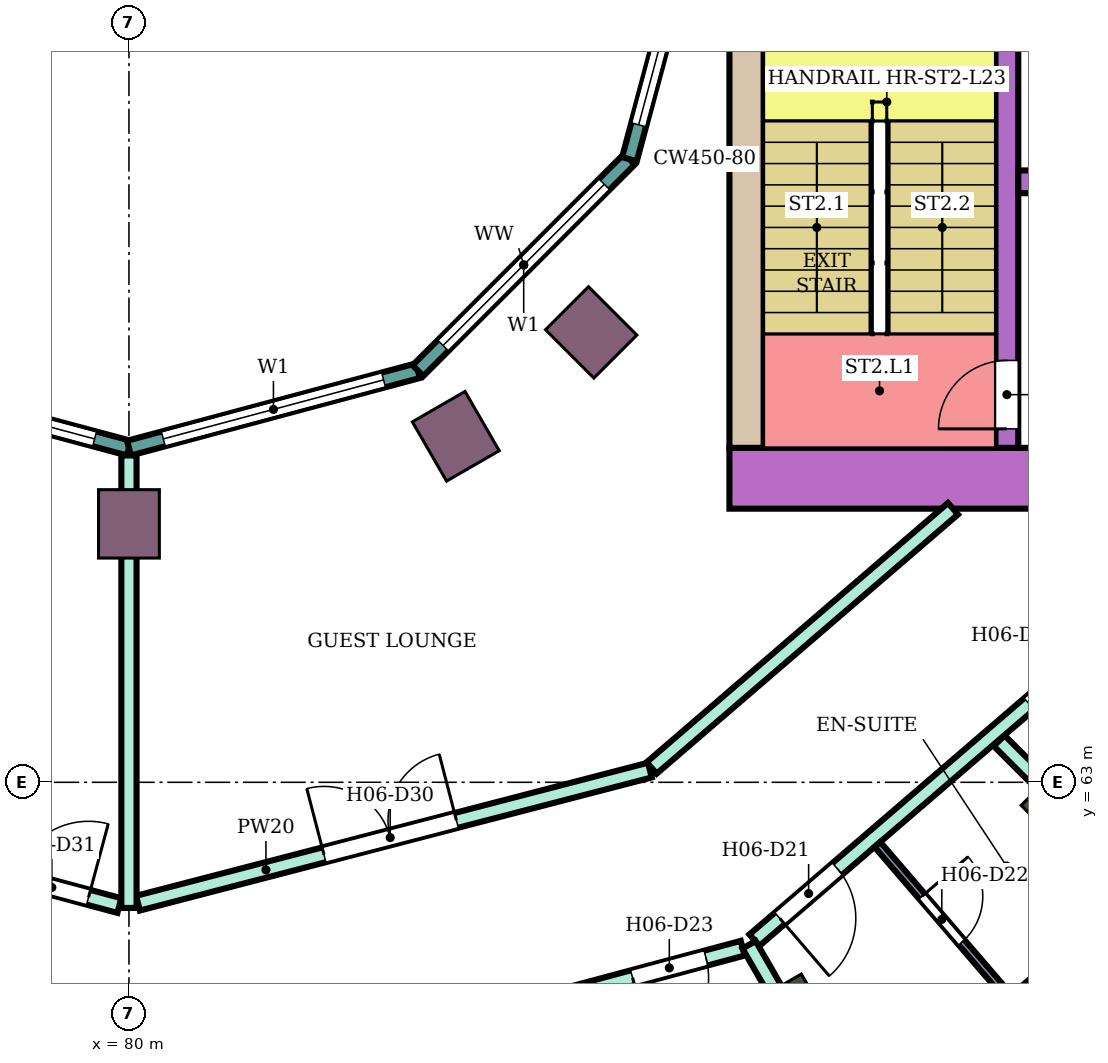
"""IFC4 building model, lengths in metres.
Left out: names, types, materials, properties, quantities, classifications, styles, units other than length and angle.
Written with IfcOpenShell. Run it as: python <this file> out.ifc"""

import sys

from ifc_helpers import new_model, si_unit, direction, frame, frame_2d, origin, origin_2d, place, context, subcontext, project, spatial, rectangle, extrude, element, fill, save


model = new_model("IFC4")
c1 = context("Model", 3, precision=1e-05, world=origin(), true_north=direction((0.0, 1.0)))
c2 = subcontext(c1, "Body", "Model", "MODEL_VIEW")
j1 = project(units=[si_unit("LENGTHUNIT", "METRE"), si_unit("PLANEANGLEUNIT", "RADIAN")], contexts=[c1])
p1 = place(None, origin())
s1 = spatial("IfcSite", under=j1, at=p1, CompositionType="ELEMENT")
p2 = place(p1, origin())
s2 = spatial("IfcBuilding", under=s1, at=p2, CompositionType="ELEMENT")
p3 = place(p2, frame((0.0, 0.0, 101.4)))
s3 = spatial("IfcBuildingStorey", under=s2, at=p3, CompositionType="ELEMENT", Elevation=101.4)
for number, where, z_axis, x_axis in (
    (1, (88.8, 59.758, 0.0), (0.0, 0.0, 1.0), (0.5, -0.866, 0.0)),
    (2, (92.445, 62.555, 0.0), (0.0, 0.0, 1.0), (0.707, -0.707, 0.0)),
):
    element("IfcColumn", number, at=place(p3, frame(where, z_axis=z_axis, x_axis=x_axis)), inside=s3, PredefinedType="COLUMN", context=c2, shape_type="SweptSolid", body=[
        extrude(rectangle(XDim=1.2, YDim=0.8, at=origin_2d()), origin(), (0.0, 0.0, 1.0), 3.8),
    ])
for number, where, z_axis, x_axis in (
    (3, (80.0, 66.4, 0.0), (0.0, 0.0, 1.0), (0.0, -1.0, 0.0)),
    (4, (84.3, 67.552, 0.0), (0.0, 0.0, 1.0), (0.5, -0.866, 0.0)),
    (5, (86.081, 68.919, 0.0), (0.0, 0.0, 1.0), (0.707, -0.707, 0.0)),
):
    element("IfcColumn", number, at=place(p3, frame(where, z_axis=z_axis, x_axis=x_axis)), inside=s3, PredefinedType="COLUMN", context=c2, shape_type="SweptSolid", body=[
        extrude(rectangle(XDim=0.9, YDim=0.8, at=origin_2d()), origin(), (0.0, 0.0, 1.0), 3.8),
    ])
p4 = place(p3, frame((87.9, 67.0, 0.0), z_axis=(0.0, 0.0, 1.0), x_axis=(1.0, 0.0, 0.0)))
e6 = element("IfcWall", 6, at=p4, inside=s3, PredefinedType="SHEAR", context=c2, shape_type="SweptSolid", body=[
    extrude(rectangle(XDim=14.7, YDim=0.8, at=frame_2d((7.35, 0.0))), origin(), (0.0, 0.0, 1.0), 3.48),
])
p5 = place(p4, frame((4.2, 0.0, 0.0)))
e7 = element("IfcOpeningElement", 7, at=p5, cuts=e6, PredefinedType="OPENING", context=c2, shape_type="SweptSolid", body=[
    extrude(rectangle(XDim=2.4, YDim=2.4, at=frame_2d((1.2, 1.2))), frame((0.0, 0.41, 0.0), z_axis=(0.0, -1.0, 0.0), x_axis=(1.0, 0.0, 0.0)), (0.0, 0.0, 1.0), 0.82),
])
p6 = place(p3, frame((88.125, 67.4, 0.0), z_axis=(0.0, 0.0, 1.0), x_axis=(0.0, 1.0, 0.0)))
e8 = element("IfcWall", 8, at=p6, inside=s3, PredefinedType="SHEAR", context=c2, shape_type="SweptSolid", body=[
    extrude(rectangle(XDim=7.6, YDim=0.45, at=frame_2d((3.8, 0.0))), origin(), (0.0, 0.0, 1.0), 3.48),
])
p7 = place(p3, frame((91.55, 67.4, 0.0), z_axis=(0.0, 0.0, 1.0), x_axis=(0.0, 1.0, 0.0)))
e9 = element("IfcWall", 9, at=p7, inside=s3, PredefinedType="SHEAR", context=c2, shape_type="SweptSolid", body=[
    extrude(rectangle(XDim=7.6, YDim=0.3, at=frame_2d((3.8, 0.0))), origin(), (0.0, 0.0, 1.0), 3.48),
])
p8 = place(p7, frame((0.25, 0.0, 0.0)))
e10 = element("IfcOpeningElement", 10, at=p8, cuts=e9, PredefinedType="OPENING", context=c2, shape_type="SweptSolid", body=[
    extrude(rectangle(XDim=0.9, YDim=2.1, at=frame_2d((0.45, 1.05))), frame((0.0, 0.16, 0.0), z_axis=(0.0, -1.0, 0.0), x_axis=(1.0, 0.0, 0.0)), (0.0, 0.0, 1.0), 0.32),
])
p9 = place(p3, frame((91.7, 70.9, 0.0), z_axis=(0.0, 0.0, 1.0), x_axis=(1.0, 0.0, 0.0)))
e11 = element("IfcWall", 11, at=p9, inside=s3, PredefinedType="SHEAR", context=c2, shape_type="SweptSolid", body=[
    extrude(rectangle(XDim=10.9, YDim=0.3, at=frame_2d((5.45, 0.0))), origin(), (0.0, 0.0, 1.0), 3.48),
])
p10 = place(p9, frame((0.4, 0.0, 0.0)))
e12 = element("IfcOpeningElement", 12, at=p10, cuts=e11, PredefinedType="OPENING", context=c2, shape_type="SweptSolid", body=[
    extrude(rectangle(XDim=1.4, YDim=2.1, at=frame_2d((0.7, 1.05))), frame((0.0, 0.16, 0.0), z_axis=(0.0, -1.0, 0.0), x_axis=(1.0, 0.0, 0.0)), (0.0, 0.0, 1.0), 0.32),
])
p11 = place(p9, frame((5.4, 0.0, 0.0)))
e13 = element("IfcOpeningElement", 13, at=p11, cuts=e11, PredefinedType="OPENING", context=c2, shape_type="SweptSolid", body=[
    extrude(rectangle(XDim=1.4, YDim=2.1, at=frame_2d((0.7, 1.05))), frame((0.0, 0.16, 0.0), z_axis=(0.0, -1.0, 0.0), x_axis=(1.0, 0.0, 0.0)), (0.0, 0.0, 1.0), 0.32),
])
p12 = place(p9, frame((8.1, 0.0, 0.0)))
e14 = element("IfcOpeningElement", 14, at=p12, cuts=e11, PredefinedType="OPENING", context=c2, shape_type="SweptSolid", body=[
    extrude(rectangle(XDim=1.0, YDim=2.1, at=frame_2d((0.5, 1.05))), frame((0.0, 0.16, 0.0), z_axis=(0.0, -1.0, 0.0), x_axis=(1.0, 0.0, 0.0)), (0.0, 0.0, 1.0), 0.32),
])
p13 = place(p3, frame((76.198, 68.415, 0.0), z_axis=(0.0, 0.0, 1.0), x_axis=(0.965933654434, -0.258789828301, 0.0)))
e15 = element("IfcWall", 15, at=p13, inside=s3, PredefinedType="NOTDEFINED", context=c2, shape_type="SweptSolid", body=[
    extrude(rectangle(XDim=3.936, YDim=0.2, at=frame_2d((1.968, 0.0))), origin(), (0.0, 0.0, 1.0), 3.8),
])
p14 = place(p13, frame((0.468, 0.0, 0.9)))
e16 = element("IfcOpeningElement", 16, at=p14, cuts=e15, PredefinedType="OPENING", context=c2, shape_type="SweptSolid", body=[
    extrude(rectangle(XDim=3.0, YDim=2.3, at=frame_2d((1.5, 1.15))), frame((0.0, 0.11, 0.0), z_axis=(0.0, -1.0, 0.0), x_axis=(1.0, 0.0, 0.0)), (0.0, 0.0, 1.0), 0.22),
])
p15 = place(p3, frame((80.0, 67.396, 0.0), z_axis=(0.0, 0.0, 1.0), x_axis=(0.965933654434, 0.258789828301, 0.0)))
e17 = element("IfcWall", 17, at=p15, inside=s3, PredefinedType="NOTDEFINED", context=c2, shape_type="SweptSolid", body=[
    extrude(rectangle(XDim=3.936, YDim=0.2, at=frame_2d((1.968, 0.0))), origin(), (0.0, 0.0, 1.0), 3.8),
])
p16 = place(p15, frame((0.468, 0.0, 0.9)))
e18 = element("IfcOpeningElement", 18, at=p16, cuts=e17, PredefinedType="OPENING", context=c2, shape_type="SweptSolid", body=[
    extrude(rectangle(XDim=3.0, YDim=2.3, at=frame_2d((1.5, 1.15))), frame((0.0, 0.11, 0.0), z_axis=(0.0, -1.0, 0.0), x_axis=(1.0, 0.0, 0.0)), (0.0, 0.0, 1.0), 0.22),
])
p17 = place(p3, frame((83.802, 68.415, 0.0), z_axis=(0.0, 0.0, 1.0), x_axis=(0.707106781187, 0.707106781187, 0.0)))
e19 = element("IfcWall", 19, at=p17, inside=s3, PredefinedType="NOTDEFINED", context=c2, shape_type="SweptSolid", body=[
    extrude(rectangle(XDim=3.936, YDim=0.2, at=frame_2d((1.968, 0.0))), origin(), (0.0, 0.0, 1.0), 3.8),
])
p18 = place(p17, frame((0.468, 0.0, 0.9)))
e20 = element("IfcOpeningElement", 20, at=p18, cuts=e19, PredefinedType="OPENING", context=c2, shape_type="SweptSolid", body=[
    extrude(rectangle(XDim=3.0, YDim=2.3, at=frame_2d((1.5, 1.15))), frame((0.0, 0.11, 0.0), z_axis=(0.0, -1.0, 0.0), x_axis=(1.0, 0.0, 0.0)), (0.0, 0.0, 1.0), 0.22),
])
p19 = place(p3, frame((86.585, 71.198, 0.0), z_axis=(0.0, 0.0, 1.0), x_axis=(0.258789828301, 0.965933654434, 0.0)))
e21 = element("IfcWall", 21, at=p19, inside=s3, PredefinedType="NOTDEFINED", context=c2, shape_type="SweptSolid", body=[
    extrude(rectangle(XDim=3.936, YDim=0.2, at=frame_2d((1.968, 0.0))), origin(), (0.0, 0.0, 1.0), 3.8),
])
p20 = place(p19, frame((0.468, 0.0, 0.9)))
e22 = element("IfcOpeningElement", 22, at=p20, cuts=e21, PredefinedType="OPENING", context=c2, shape_type="SweptSolid", body=[
    extrude(rectangle(XDim=3.0, YDim=2.3, at=frame_2d((1.5, 1.15))), frame((0.0, 0.11, 0.0), z_axis=(0.0, -1.0, 0.0), x_axis=(1.0, 0.0, 0.0)), (0.0, 0.0, 1.0), 0.22),
])
p21 = place(p3, frame((71.877, 60.831, 0.0), z_axis=(0.0, 0.0, 1.0), x_axis=(0.965905026676, -0.258896657842, 0.0)))
e23 = element("IfcWall", 23, at=p21, inside=s3, PredefinedType="PARTITIONING", context=c2, shape_type="SweptSolid", body=[
    extrude(rectangle(XDim=8.36, YDim=0.2, at=frame_2d((4.18, 0.0))), origin(), (0.0, 0.0, 1.0), 3.35),
])
p22 = place(p21, frame((4.655, 0.0, 0.0)))
e24 = element("IfcOpeningElement", 24, at=p22, cuts=e23, PredefinedType="OPENING", context=c2, shape_type="SweptSolid", body=[
    extrude(rectangle(XDim=1.8, YDim=2.1, at=frame_2d((0.9, 1.05))), frame((0.0, 0.11, 0.0), z_axis=(0.0, -1.0, 0.0), x_axis=(1.0, 0.0, 0.0)), (0.0, 0.0, 1.0), 0.22),
])
p23 = place(p3, frame((73.297, 63.143, 0.0), z_axis=(0.0, 0.0, 1.0), x_axis=(0.965859030528, -0.25906820173, 0.0)))
e25 = element("IfcWall", 25, at=p23, inside=s3, PredefinedType="PARTITIONING", context=c2, shape_type="SweptSolid", body=[
    extrude(rectangle(XDim=6.81, YDim=0.2, at=frame_2d((3.405, 0.0))), origin(), (0.0, 0.0, 1.0), 3.35),
])
p24 = place(p23, frame((5.39, 0.0, 0.0)))
e26 = element("IfcOpeningElement", 26, at=p24, cuts=e25, PredefinedType="OPENING", context=c2, shape_type="SweptSolid", body=[
    extrude(rectangle(XDim=1.0, YDim=2.1, at=frame_2d((0.5, 1.05))), frame((0.0, 0.11, 0.0), z_axis=(0.0, -1.0, 0.0), x_axis=(1.0, 0.0, 0.0)), (0.0, 0.0, 1.0), 0.22),
])
p25 = place(p3, frame((80.119, 61.41, 0.0), z_axis=(0.0, 0.0, 1.0), x_axis=(0.967823361235, 0.251630565408, 0.0)))
e27 = element("IfcWall", 27, at=p25, inside=s3, PredefinedType="PARTITIONING", context=c2, shape_type="SweptSolid", body=[
    extrude(rectangle(XDim=6.958, YDim=0.2, at=frame_2d((3.479, 0.0))), origin(), (0.0, 0.0, 1.0), 3.35),
])
p26 = place(p25, frame((2.529, 0.0, 0.0)))
e28 = element("IfcOpeningElement", 28, at=p26, cuts=e27, PredefinedType="OPENING", context=c2, shape_type="SweptSolid", body=[
    extrude(rectangle(XDim=1.8, YDim=2.1, at=frame_2d((0.9, 1.05))), frame((0.0, 0.11, 0.0), z_axis=(0.0, -1.0, 0.0), x_axis=(1.0, 0.0, 0.0)), (0.0, 0.0, 1.0), 0.22),
])
p27 = place(p3, frame((80.0, 58.655, 0.0), z_axis=(0.0, 0.0, 1.0), x_axis=(0.965967338894, 0.258664068224, 0.0)))
e29 = element("IfcWall", 29, at=p27, inside=s3, PredefinedType="PARTITIONING", context=c2, shape_type="SweptSolid", body=[
    extrude(rectangle(XDim=8.36, YDim=0.2, at=frame_2d((4.18, 0.0))), origin(), (0.0, 0.0, 1.0), 3.35),
])
p28 = place(p27, frame((6.86, 0.0, 0.0)))
e30 = element("IfcOpeningElement", 30, at=p28, cuts=e29, PredefinedType="OPENING", context=c2, shape_type="SweptSolid", body=[
    extrude(rectangle(XDim=1.0, YDim=2.1, at=frame_2d((0.5, 1.05))), frame((0.0, 0.11, 0.0), z_axis=(0.0, -1.0, 0.0), x_axis=(1.0, 0.0, 0.0)), (0.0, 0.0, 1.0), 0.22),
])
p29 = place(p3, frame((80.0, 61.347, 0.0), z_axis=(0.0, 0.0, 1.0), x_axis=(0.0, 1.0, 0.0)))
e31 = element("IfcWall", 31, at=p29, inside=s3, PredefinedType="PARTITIONING", context=c2, shape_type="SweptSolid", body=[
    extrude(rectangle(XDim=5.953, YDim=0.2, at=frame_2d((2.977, 0.0))), origin(), (0.0, 0.0, 1.0), 3.35),
])
p30 = place(p3, frame((86.877, 63.189, 0.0), z_axis=(0.0, 0.0, 1.0), x_axis=(0.758088707506, 0.652151448325, 0.0)))
e32 = element("IfcWall", 32, at=p30, inside=s3, PredefinedType="PARTITIONING", context=c2, shape_type="SweptSolid", body=[
    extrude(rectangle(XDim=5.229, YDim=0.2, at=frame_2d((2.615, 0.0))), origin(), (0.0, 0.0, 1.0), 3.35),
])
p31 = place(p3, frame((88.229, 60.923, 0.0), z_axis=(0.0, 0.0, 1.0), x_axis=(0.758220952094, 0.651997690031, 0.0)))
e33 = element("IfcWall", 33, at=p31, inside=s3, PredefinedType="PARTITIONING", context=c2, shape_type="SweptSolid", body=[
    extrude(rectangle(XDim=6.346, YDim=0.2, at=frame_2d((3.173, 0.0))), origin(), (0.0, 0.0, 1.0), 3.35),
])
p32 = place(p31, frame((4.767, 0.0, 0.0)))
e34 = element("IfcOpeningElement", 34, at=p32, cuts=e33, PredefinedType="OPENING", context=c2, shape_type="SweptSolid", body=[
    extrude(rectangle(XDim=1.0, YDim=2.1, at=frame_2d((0.5, 1.05))), frame((0.0, 0.11, 0.0), z_axis=(0.0, -1.0, 0.0), x_axis=(1.0, 0.0, 0.0)), (0.0, 0.0, 1.0), 0.22),
])
p33 = place(p31, frame((0.44, 0.0, 0.0)))
e35 = element("IfcOpeningElement", 35, at=p33, cuts=e33, PredefinedType="OPENING", context=c2, shape_type="SweptSolid", body=[
    extrude(rectangle(XDim=1.0, YDim=2.1, at=frame_2d((0.5, 1.05))), frame((0.0, 0.11, 0.0), z_axis=(0.0, -1.0, 0.0), x_axis=(1.0, 0.0, 0.0)), (0.0, 0.0, 1.0), 0.22),
])
p34 = place(p3, frame((88.158, 60.862, 0.0), z_axis=(0.0, 0.0, 1.0), x_axis=(0.499916512745, -0.866073599808, 0.0)))
e36 = element("IfcWall", 36, at=p34, inside=s3, PredefinedType="PARTITIONING", context=c2, shape_type="SweptSolid", body=[
    extrude(rectangle(XDim=9.475, YDim=0.2, at=frame_2d((4.737, 0.0))), origin(), (0.0, 0.0, 1.0), 3.35),
])
p35 = place(p3, frame((91.448, 63.547, 0.0), z_axis=(0.0, 0.0, 1.0), x_axis=(0.706949958062, -0.707263569538, 0.0)))
e37 = element("IfcWall", 37, at=p35, inside=s3, PredefinedType="PARTITIONING", context=c2, shape_type="SweptSolid", body=[
    extrude(rectangle(XDim=7.006, YDim=0.2, at=frame_2d((3.503, 0.0))), origin(), (0.0, 0.0, 1.0), 3.35),
])
p36 = place(p3, frame((89.846, 62.182, 0.0), z_axis=(0.0, 0.0, 1.0), x_axis=(0.652095405055, -0.758136915541, 0.0)))
e38 = element("IfcWall", 38, at=p36, inside=s3, PredefinedType="PARTITIONING", context=c2, shape_type="SweptSolid", body=[
    extrude(rectangle(XDim=2.65, YDim=0.1, at=frame_2d((1.325, 0.0))), origin(), (0.0, 0.0, 1.0), 3.35),
])
p37 = place(p36, frame((0.9, 0.0, 0.0)))
e39 = element("IfcOpeningElement", 39, at=p37, cuts=e38, PredefinedType="OPENING", context=c2, shape_type="SweptSolid", body=[
    extrude(rectangle(XDim=0.8, YDim=2.1, at=frame_2d((0.4, 1.05))), frame((0.0, 0.06, 0.0), z_axis=(0.0, -1.0, 0.0), x_axis=(1.0, 0.0, 0.0)), (0.0, 0.0, 1.0), 0.12),
])
p38 = place(p3, frame((91.607, 60.135, 0.0), z_axis=(0.0, 0.0, 1.0), x_axis=(0.758135842672, 0.652096652388, 0.0)))
e40 = element("IfcWall", 40, at=p38, inside=s3, PredefinedType="PARTITIONING", context=c2, shape_type="SweptSolid", body=[
    extrude(rectangle(XDim=2.201, YDim=0.1, at=frame_2d((1.101, 0.0))), origin(), (0.0, 0.0, 1.0), 3.35),
])
p39 = place(p14, origin())
e41 = element("IfcWindow", 41, at=p39, inside=s3, PartitioningType="SINGLE_PANEL", PredefinedType="WINDOW", context=c2, shape_type="SweptSolid", body=[
    extrude(rectangle(XDim=3.0, YDim=2.3, at=frame_2d((1.5, 1.15))), frame((0.0, 0.03, 0.0), z_axis=(0.0, -1.0, 0.0), x_axis=(1.0, 0.0, 0.0)), (0.0, 0.0, 1.0), 0.06),
])
fill(e16, e41)
p40 = place(p16, origin())
e42 = element("IfcWindow", 42, at=p40, inside=s3, PartitioningType="SINGLE_PANEL", PredefinedType="WINDOW", context=c2, shape_type="SweptSolid", body=[
    extrude(rectangle(XDim=3.0, YDim=2.3, at=frame_2d((1.5, 1.15))), frame((0.0, 0.03, 0.0), z_axis=(0.0, -1.0, 0.0), x_axis=(1.0, 0.0, 0.0)), (0.0, 0.0, 1.0), 0.06),
])
fill(e18, e42)
p41 = place(p18, origin())
e43 = element("IfcWindow", 43, at=p41, inside=s3, PartitioningType="SINGLE_PANEL", PredefinedType="WINDOW", context=c2, shape_type="SweptSolid", body=[
    extrude(rectangle(XDim=3.0, YDim=2.3, at=frame_2d((1.5, 1.15))), frame((0.0, 0.03, 0.0), z_axis=(0.0, -1.0, 0.0), x_axis=(1.0, 0.0, 0.0)), (0.0, 0.0, 1.0), 0.06),
])
fill(e20, e43)
p42 = place(p20, origin())
e44 = element("IfcWindow", 44, at=p42, inside=s3, PartitioningType="SINGLE_PANEL", PredefinedType="WINDOW", context=c2, shape_type="SweptSolid", body=[
    extrude(rectangle(XDim=3.0, YDim=2.3, at=frame_2d((1.5, 1.15))), frame((0.0, 0.03, 0.0), z_axis=(0.0, -1.0, 0.0), x_axis=(1.0, 0.0, 0.0)), (0.0, 0.0, 1.0), 0.06),
])
fill(e22, e44)
p43 = place(p32, frame((1.0, 0.0, 0.0), z_axis=(0.0, 0.0, 1.0), x_axis=(-1.0, 0.0, 0.0)))
e45 = element("IfcDoor", 45, at=p43, inside=s3, OperationType="SINGLE_SWING_RIGHT", PredefinedType="DOOR", context=c2, shape_type="SweptSolid", body=[
    extrude(rectangle(XDim=1.0, YDim=2.1, at=frame_2d((0.5, 1.05))), frame((0.0, 0.025, 0.0), z_axis=(0.0, -1.0, 0.0), x_axis=(1.0, 0.0, 0.0)), (0.0, 0.0, 1.0), 0.05),
])
fill(e34, e45)
p44 = place(p33, frame((1.0, 0.0, 0.0), z_axis=(0.0, 0.0, 1.0), x_axis=(-1.0, 0.0, 0.0)))
e46 = element("IfcDoor", 46, at=p44, inside=s3, OperationType="SINGLE_SWING_RIGHT", PredefinedType="DOOR", context=c2, shape_type="SweptSolid", body=[
    extrude(rectangle(XDim=1.0, YDim=2.1, at=frame_2d((0.5, 1.05))), frame((0.0, 0.025, 0.0), z_axis=(0.0, -1.0, 0.0), x_axis=(1.0, 0.0, 0.0)), (0.0, 0.0, 1.0), 0.05),
])
fill(e35, e46)
p45 = place(p37, origin())
e47 = element("IfcDoor", 47, at=p45, inside=s3, OperationType="SINGLE_SWING_LEFT", PredefinedType="DOOR", context=c2, shape_type="SweptSolid", body=[
    extrude(rectangle(XDim=0.8, YDim=2.1, at=frame_2d((0.4, 1.05))), frame((0.0, 0.025, 0.0), z_axis=(0.0, -1.0, 0.0), x_axis=(1.0, 0.0, 0.0)), (0.0, 0.0, 1.0), 0.05),
])
fill(e39, e47)
p46 = place(p28, frame((1.0, 0.0, 0.0), z_axis=(0.0, 0.0, 1.0), x_axis=(-1.0, 0.0, 0.0)))
e48 = element("IfcDoor", 48, at=p46, inside=s3, OperationType="SINGLE_SWING_RIGHT", PredefinedType="DOOR", context=c2, shape_type="SweptSolid", body=[
    extrude(rectangle(XDim=1.0, YDim=2.1, at=frame_2d((0.5, 1.05))), frame((0.0, 0.025, 0.0), z_axis=(0.0, -1.0, 0.0), x_axis=(1.0, 0.0, 0.0)), (0.0, 0.0, 1.0), 0.05),
])
fill(e30, e48)
p47 = place(p26, origin())
e49 = element("IfcDoor", 49, at=p47, inside=s3, OperationType="DOUBLE_DOOR_SINGLE_SWING", PredefinedType="DOOR", context=c2, shape_type="SweptSolid", body=[
    extrude(rectangle(XDim=1.8, YDim=2.1, at=frame_2d((0.9, 1.05))), frame((0.0, 0.025, 0.0), z_axis=(0.0, -1.0, 0.0), x_axis=(1.0, 0.0, 0.0)), (0.0, 0.0, 1.0), 0.05),
])
fill(e28, e49)
p48 = place(p24, origin())
e50 = element("IfcDoor", 50, at=p48, inside=s3, OperationType="SINGLE_SWING_RIGHT", PredefinedType="DOOR", context=c2, shape_type="SweptSolid", body=[
    extrude(rectangle(XDim=1.0, YDim=2.1, at=frame_2d((0.5, 1.05))), frame((0.0, 0.025, 0.0), z_axis=(0.0, -1.0, 0.0), x_axis=(1.0, 0.0, 0.0)), (0.0, 0.0, 1.0), 0.05),
])
fill(e26, e50)
p49 = place(p8, origin())
e51 = element("IfcDoor", 51, at=p49, inside=s3, OperationType="SINGLE_SWING_LEFT", PredefinedType="DOOR", context=c2, shape_type="SweptSolid", body=[
    extrude(rectangle(XDim=0.9, YDim=2.1, at=frame_2d((0.45, 1.05))), frame((0.0, 0.025, 0.0), z_axis=(0.0, -1.0, 0.0), x_axis=(1.0, 0.0, 0.0)), (0.0, 0.0, 1.0), 0.05),
])
fill(e10, e51)
save(model, sys.argv[1])
